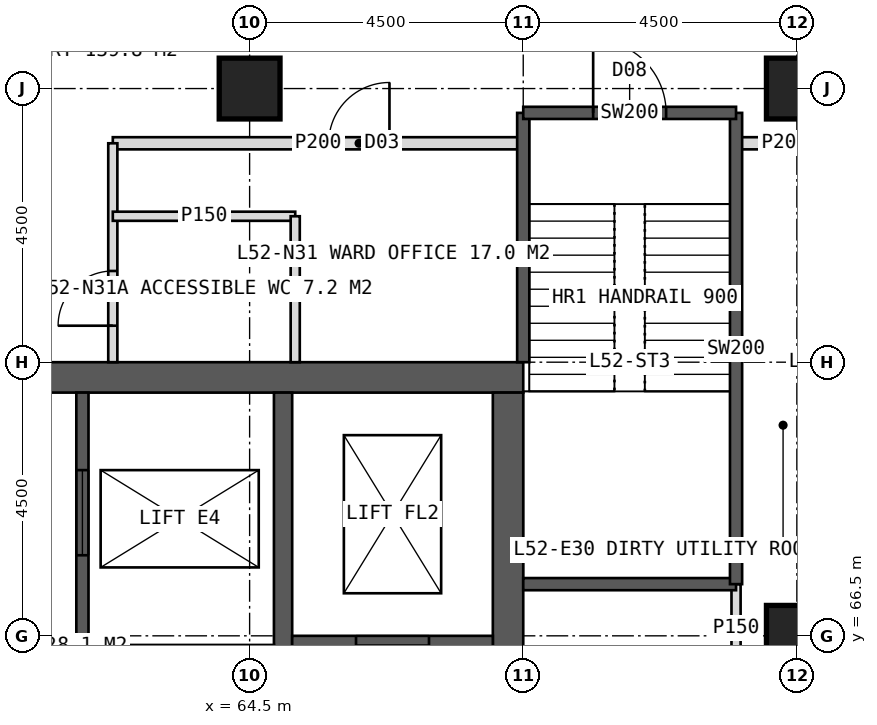
"""IFC4 building model, lengths in metres.
Left out: names, types, materials, properties, quantities, classifications, styles, units other than length and angle.
Written with IfcOpenShell. Run it as: python <this file> out.ifc"""

import sys

from ifc_helpers import new_model, si_unit, direction, frame, frame_2d, origin, origin_2d, place, context, subcontext, project, spatial, rectangle, hollow_rectangle, extrude, element, fill, save


model = new_model("IFC4")
c1 = context("Model", 3, precision=1e-05, world=origin(), true_north=direction((0.0, 1.0)))
c2 = subcontext(c1, "Body", "Model", "MODEL_VIEW")
j1 = project(units=[si_unit("LENGTHUNIT", "METRE"), si_unit("PLANEANGLEUNIT", "RADIAN")], contexts=[c1])
p1 = place(None, origin())
s1 = spatial("IfcSite", under=j1, at=p1, CompositionType="ELEMENT")
p2 = place(p1, origin())
s2 = spatial("IfcBuilding", under=s1, at=p2, CompositionType="ELEMENT")
p3 = place(p2, frame((0.0, 0.0, 217.0)))
s3 = spatial("IfcBuildingStorey", under=s2, at=p3, CompositionType="ELEMENT", Elevation=217.0)
p4 = place(p3, frame((51.0, 70.75, 0.0), z_axis=(0.0, 0.0, 1.0), x_axis=(1.0, 0.0, 0.0)))
e1 = element("IfcWall", 1, at=p4, inside=s3, PredefinedType="SHEAR", context=c2, shape_type="SweptSolid", body=[
    extrude(rectangle(XDim=18.0, YDim=0.5, at=frame_2d((9.0, 0.0))), origin(), (0.0, 0.0, 1.0), 4.0),
])
p5 = place(p4, frame((8.1, 0.0, 0.0)))
e2 = element("IfcOpeningElement", 2, at=p5, cuts=e1, PredefinedType="OPENING", context=c2, shape_type="SweptSolid", body=[
    extrude(rectangle(XDim=1.8, YDim=2.2, at=frame_2d((0.9, 1.1))), frame((0.0, 0.26, 0.0), z_axis=(0.0, -1.0, 0.0), x_axis=(1.0, 0.0, 0.0)), (0.0, 0.0, 1.0), 0.52),
])
p6 = place(p3, frame((68.75, 53.5, 0.0), z_axis=(0.0, 0.0, 1.0), x_axis=(0.0, 1.0, 0.0)))
e3 = element("IfcWall", 3, at=p6, inside=s3, PredefinedType="SHEAR", context=c2, shape_type="SweptSolid", body=[
    extrude(rectangle(XDim=17.0, YDim=0.5, at=frame_2d((8.5, 0.0))), origin(), (0.0, 0.0, 1.0), 4.0),
])
p7 = place(p6, frame((9.6, 0.0, 0.0)))
e4 = element("IfcOpeningElement", 4, at=p7, cuts=e3, PredefinedType="OPENING", context=c2, shape_type="SweptSolid", body=[
    extrude(rectangle(XDim=1.5, YDim=2.2, at=frame_2d((0.75, 1.1))), frame((0.0, 0.26, 0.0), z_axis=(0.0, -1.0, 0.0), x_axis=(1.0, 0.0, 0.0)), (0.0, 0.0, 1.0), 0.52),
])
p8 = place(p3, frame((65.05, 53.5, 0.0), z_axis=(0.0, 0.0, 1.0), x_axis=(0.0, 1.0, 0.0)))
e5 = element("IfcWall", 5, at=p8, inside=s3, PredefinedType="SHEAR", context=c2, shape_type="SweptSolid", body=[
    extrude(rectangle(XDim=17.0, YDim=0.3, at=frame_2d((8.5, 0.0))), origin(), (0.0, 0.0, 1.0), 4.0),
])
p9 = place(p3, frame((61.75, 53.5, 0.0), z_axis=(0.0, 0.0, 1.0), x_axis=(0.0, 1.0, 0.0)))
e6 = element("IfcWall", 6, at=p9, inside=s3, PredefinedType="SHEAR", context=c2, shape_type="SweptSolid", body=[
    extrude(rectangle(XDim=17.0, YDim=0.2, at=frame_2d((8.5, 0.0))), origin(), (0.0, 0.0, 1.0), 4.0),
])
p10 = place(p9, frame((0.6, 0.0, 0.0)))
e7 = element("IfcOpeningElement", 7, at=p10, cuts=e6, PredefinedType="OPENING", context=c2, shape_type="SweptSolid", body=[
    extrude(rectangle(XDim=1.0, YDim=2.1, at=frame_2d((0.5, 1.05))), frame((0.0, 0.11, 0.0), z_axis=(0.0, -1.0, 0.0), x_axis=(1.0, 0.0, 0.0)), (0.0, 0.0, 1.0), 0.22),
])
p11 = place(p9, frame((2.75, 0.0, 0.0)))
e8 = element("IfcOpeningElement", 8, at=p11, cuts=e6, PredefinedType="OPENING", context=c2, shape_type="SweptSolid", body=[
    extrude(rectangle(XDim=1.0, YDim=2.1, at=frame_2d((0.5, 1.05))), frame((0.0, 0.11, 0.0), z_axis=(0.0, -1.0, 0.0), x_axis=(1.0, 0.0, 0.0)), (0.0, 0.0, 1.0), 0.22),
])
p12 = place(p9, frame((4.824, 0.0, 0.0)))
e9 = element("IfcOpeningElement", 9, at=p12, cuts=e6, PredefinedType="OPENING", context=c2, shape_type="SweptSolid", body=[
    extrude(rectangle(XDim=1.0, YDim=2.1, at=frame_2d((0.5, 1.05))), frame((0.0, 0.11, 0.0), z_axis=(0.0, -1.0, 0.0), x_axis=(1.0, 0.0, 0.0)), (0.0, 0.0, 1.0), 0.22),
])
p13 = place(p9, frame((6.924, 0.0, 0.0)))
e10 = element("IfcOpeningElement", 10, at=p13, cuts=e6, PredefinedType="OPENING", context=c2, shape_type="SweptSolid", body=[
    extrude(rectangle(XDim=1.0, YDim=2.1, at=frame_2d((0.5, 1.05))), frame((0.0, 0.11, 0.0), z_axis=(0.0, -1.0, 0.0), x_axis=(1.0, 0.0, 0.0)), (0.0, 0.0, 1.0), 0.22),
])
p14 = place(p9, frame((10.025, 0.0, 0.0)))
e11 = element("IfcOpeningElement", 11, at=p14, cuts=e6, PredefinedType="OPENING", context=c2, shape_type="SweptSolid", body=[
    extrude(rectangle(XDim=1.4, YDim=2.2, at=frame_2d((0.7, 1.1))), frame((0.0, 0.11, 0.0), z_axis=(0.0, -1.0, 0.0), x_axis=(1.0, 0.0, 0.0)), (0.0, 0.0, 1.0), 0.22),
])
p15 = place(p9, frame((14.325, 0.0, 0.0)))
e12 = element("IfcOpeningElement", 12, at=p15, cuts=e6, PredefinedType="OPENING", context=c2, shape_type="SweptSolid", body=[
    extrude(rectangle(XDim=1.4, YDim=2.2, at=frame_2d((0.7, 1.1))), frame((0.0, 0.11, 0.0), z_axis=(0.0, -1.0, 0.0), x_axis=(1.0, 0.0, 0.0)), (0.0, 0.0, 1.0), 0.22),
])
p16 = place(p3, frame((65.2, 66.35, 0.0), z_axis=(0.0, 0.0, 1.0), x_axis=(1.0, 0.0, 0.0)))
e13 = element("IfcWall", 13, at=p16, inside=s3, PredefinedType="SHEAR", context=c2, shape_type="SweptSolid", body=[
    extrude(rectangle(XDim=3.3, YDim=0.3, at=frame_2d((1.65, 0.0))), origin(), (0.0, 0.0, 1.0), 4.0),
])
p17 = place(p16, frame((1.05, 0.0, 0.0)))
e14 = element("IfcOpeningElement", 14, at=p17, cuts=e13, PredefinedType="OPENING", context=c2, shape_type="SweptSolid", body=[
    extrude(rectangle(XDim=1.2, YDim=2.2, at=frame_2d((0.6, 1.1))), frame((0.0, 0.16, 0.0), z_axis=(0.0, -1.0, 0.0), x_axis=(1.0, 0.0, 0.0)), (0.0, 0.0, 1.0), 0.32),
])
for number, where, z_axis, x_axis in (
    (15, (73.5, 75.5, 0.0), (0.0, 0.0, 1.0), (1.0, 0.0, 0.0)),
    (16, (64.5, 75.5, 0.0), (0.0, 0.0, 1.0), (1.0, 0.0, 0.0)),
    (17, (73.5, 66.5, 0.0), (0.0, 0.0, 1.0), (1.0, 0.0, 0.0)),
):
    element("IfcColumn", number, at=place(p3, frame(where, z_axis=z_axis, x_axis=x_axis)), inside=s3, PredefinedType="COLUMN", context=c2, shape_type="SweptSolid", body=[
        extrude(hollow_rectangle(XDim=1.0, YDim=1.0, WallThickness=0.1, at=origin_2d()), origin(), (0.0, 0.0, 1.0), 4.0),
    ])
p18 = place(p3, frame((62.25, 74.6, 0.0), z_axis=(0.0, 0.0, 1.0), x_axis=(1.0, 0.0, 0.0)))
e18 = element("IfcWall", 18, at=p18, inside=s3, PredefinedType="PARTITIONING", context=c2, shape_type="SweptSolid", body=[
    extrude(rectangle(XDim=6.75, YDim=0.2, at=frame_2d((3.375, 0.0))), origin(), (0.0, 0.0, 1.0), 3.75),
])
p19 = place(p18, frame((3.55, 0.0, 0.0)))
e19 = element("IfcOpeningElement", 19, at=p19, cuts=e18, PredefinedType="OPENING", context=c2, shape_type="SweptSolid", body=[
    extrude(rectangle(XDim=1.0, YDim=2.1, at=frame_2d((0.5, 1.05))), frame((0.0, 0.11, 0.0), z_axis=(0.0, -1.0, 0.0), x_axis=(1.0, 0.0, 0.0)), (0.0, 0.0, 1.0), 0.22),
])
p20 = place(p3, frame((72.5, 74.6, 0.0), z_axis=(0.0, 0.0, 1.0), x_axis=(1.0, 0.0, 0.0)))
e20 = element("IfcWall", 20, at=p20, inside=s3, PredefinedType="PARTITIONING", context=c2, shape_type="SweptSolid", body=[
    extrude(rectangle(XDim=1.6, YDim=0.2, at=frame_2d((0.8, 0.0))), origin(), (0.0, 0.0, 1.0), 3.75),
])
p21 = place(p3, frame((62.25, 71.0, 0.0), z_axis=(0.0, 0.0, 1.0), x_axis=(0.0, 1.0, 0.0)))
e21 = element("IfcWall", 21, at=p21, inside=s3, PredefinedType="PARTITIONING", context=c2, shape_type="SweptSolid", body=[
    extrude(rectangle(XDim=3.6, YDim=0.15, at=frame_2d((1.8, 0.0))), origin(), (0.0, 0.0, 1.0), 3.75),
])
p22 = place(p21, frame((0.6, 0.0, 0.0)))
e22 = element("IfcOpeningElement", 22, at=p22, cuts=e21, PredefinedType="OPENING", context=c2, shape_type="SweptSolid", body=[
    extrude(rectangle(XDim=0.9, YDim=2.1, at=frame_2d((0.45, 1.05))), frame((0.0, 0.085, 0.0), z_axis=(0.0, -1.0, 0.0), x_axis=(1.0, 0.0, 0.0)), (0.0, 0.0, 1.0), 0.17),
])
p23 = place(p3, frame((62.25, 73.4, 0.0), z_axis=(0.0, 0.0, 1.0), x_axis=(1.0, 0.0, 0.0)))
e23 = element("IfcWall", 23, at=p23, inside=s3, PredefinedType="PARTITIONING", context=c2, shape_type="SweptSolid", body=[
    extrude(rectangle(XDim=3.0, YDim=0.15, at=frame_2d((1.5, 0.0))), origin(), (0.0, 0.0, 1.0), 3.75),
])
p24 = place(p3, frame((65.25, 71.0, 0.0), z_axis=(0.0, 0.0, 1.0), x_axis=(0.0, 1.0, 0.0)))
e24 = element("IfcWall", 24, at=p24, inside=s3, PredefinedType="PARTITIONING", context=c2, shape_type="SweptSolid", body=[
    extrude(rectangle(XDim=2.4, YDim=0.15, at=frame_2d((1.2, 0.0))), origin(), (0.0, 0.0, 1.0), 3.75),
])
p25 = place(p3, frame((72.5, 65.9, 0.0), z_axis=(0.0, 0.0, 1.0), x_axis=(0.0, 1.0, 0.0)))
e25 = element("IfcWall", 25, at=p25, inside=s3, PredefinedType="PARTITIONING", context=c2, shape_type="SweptSolid", body=[
    extrude(rectangle(XDim=1.45, YDim=0.15, at=frame_2d((0.725, 0.0))), origin(), (0.0, 0.0, 1.0), 3.75),
])
p26 = place(p3, frame((69.0, 71.0, 0.0), z_axis=(0.0, 0.0, 1.0), x_axis=(0.0, 1.0, 0.0)))
e26 = element("IfcWall", 26, at=p26, inside=s3, PredefinedType="SOLIDWALL", context=c2, shape_type="SweptSolid", body=[
    extrude(rectangle(XDim=4.1, YDim=0.2, at=frame_2d((2.05, 0.0))), origin(), (0.0, 0.0, 1.0), 3.75),
])
p27 = place(p3, frame((69.0, 67.35, 0.0), z_axis=(0.0, 0.0, 1.0), x_axis=(1.0, 0.0, 0.0)))
e27 = element("IfcWall", 27, at=p27, inside=s3, PredefinedType="SOLIDWALL", context=c2, shape_type="SweptSolid", body=[
    extrude(rectangle(XDim=3.5, YDim=0.2, at=frame_2d((1.75, 0.0))), origin(), (0.0, 0.0, 1.0), 3.75),
])
p28 = place(p3, frame((72.5, 67.35, 0.0), z_axis=(0.0, 0.0, 1.0), x_axis=(0.0, 1.0, 0.0)))
e28 = element("IfcWall", 28, at=p28, inside=s3, PredefinedType="SOLIDWALL", context=c2, shape_type="SweptSolid", body=[
    extrude(rectangle(XDim=7.75, YDim=0.2, at=frame_2d((3.875, 0.0))), origin(), (0.0, 0.0, 1.0), 3.75),
])
p29 = place(p3, frame((69.0, 75.1, 0.0), z_axis=(0.0, 0.0, 1.0), x_axis=(1.0, 0.0, 0.0)))
e29 = element("IfcWall", 29, at=p29, inside=s3, PredefinedType="SOLIDWALL", context=c2, shape_type="SweptSolid", body=[
    extrude(rectangle(XDim=3.5, YDim=0.2, at=frame_2d((1.75, 0.0))), origin(), (0.0, 0.0, 1.0), 3.75),
])
p30 = place(p29, frame((1.15, 0.0, 0.0)))
e30 = element("IfcOpeningElement", 30, at=p30, cuts=e29, PredefinedType="OPENING", context=c2, shape_type="SweptSolid", body=[
    extrude(rectangle(XDim=1.2, YDim=2.1, at=frame_2d((0.6, 1.05))), frame((0.0, 0.11, 0.0), z_axis=(0.0, -1.0, 0.0), x_axis=(1.0, 0.0, 0.0)), (0.0, 0.0, 1.0), 0.22),
])
p31 = place(p22, origin())
e31 = element("IfcDoor", 31, at=p31, inside=s3, OperationType="SINGLE_SWING_LEFT", PredefinedType="DOOR", context=c2, shape_type="SweptSolid", body=[
    extrude(rectangle(XDim=0.9, YDim=2.1, at=frame_2d((0.45, 1.05))), frame((0.0, 0.025, 0.0), z_axis=(0.0, -1.0, 0.0), x_axis=(1.0, 0.0, 0.0)), (0.0, 0.0, 1.0), 0.05),
])
fill(e22, e31)
p32 = place(p19, origin())
e32 = element("IfcDoor", 32, at=p32, inside=s3, OperationType="SINGLE_SWING_RIGHT", PredefinedType="DOOR", context=c2, shape_type="SweptSolid", body=[
    extrude(rectangle(XDim=1.0, YDim=2.1, at=frame_2d((0.5, 1.05))), frame((0.0, 0.025, 0.0), z_axis=(0.0, -1.0, 0.0), x_axis=(1.0, 0.0, 0.0)), (0.0, 0.0, 1.0), 0.05),
])
fill(e19, e32)
p33 = place(p17, origin())
e33 = element("IfcDoor", 33, at=p33, inside=s3, OperationType="SLIDING_TO_LEFT", PredefinedType="DOOR", context=c2, shape_type="SweptSolid", body=[
    extrude(rectangle(XDim=1.2, YDim=2.2, at=frame_2d((0.6, 1.1))), frame((0.0, 0.025, 0.0), z_axis=(0.0, -1.0, 0.0), x_axis=(1.0, 0.0, 0.0)), (0.0, 0.0, 1.0), 0.05),
])
fill(e14, e33)
p34 = place(p15, origin())
e34 = element("IfcDoor", 34, at=p34, inside=s3, OperationType="SLIDING_TO_LEFT", PredefinedType="DOOR", context=c2, shape_type="SweptSolid", body=[
    extrude(rectangle(XDim=1.4, YDim=2.2, at=frame_2d((0.7, 1.1))), frame((0.0, 0.025, 0.0), z_axis=(0.0, -1.0, 0.0), x_axis=(1.0, 0.0, 0.0)), (0.0, 0.0, 1.0), 0.05),
])
fill(e12, e34)
p35 = place(p30, origin())
e35 = element("IfcDoor", 35, at=p35, inside=s3, OperationType="SINGLE_SWING_LEFT", PredefinedType="DOOR", context=c2, shape_type="SweptSolid", body=[
    extrude(rectangle(XDim=1.2, YDim=2.1, at=frame_2d((0.6, 1.05))), frame((0.0, 0.025, 0.0), z_axis=(0.0, -1.0, 0.0), x_axis=(1.0, 0.0, 0.0)), (0.0, 0.0, 1.0), 0.05),
])
fill(e30, e35)
save(model, sys.argv[1])
